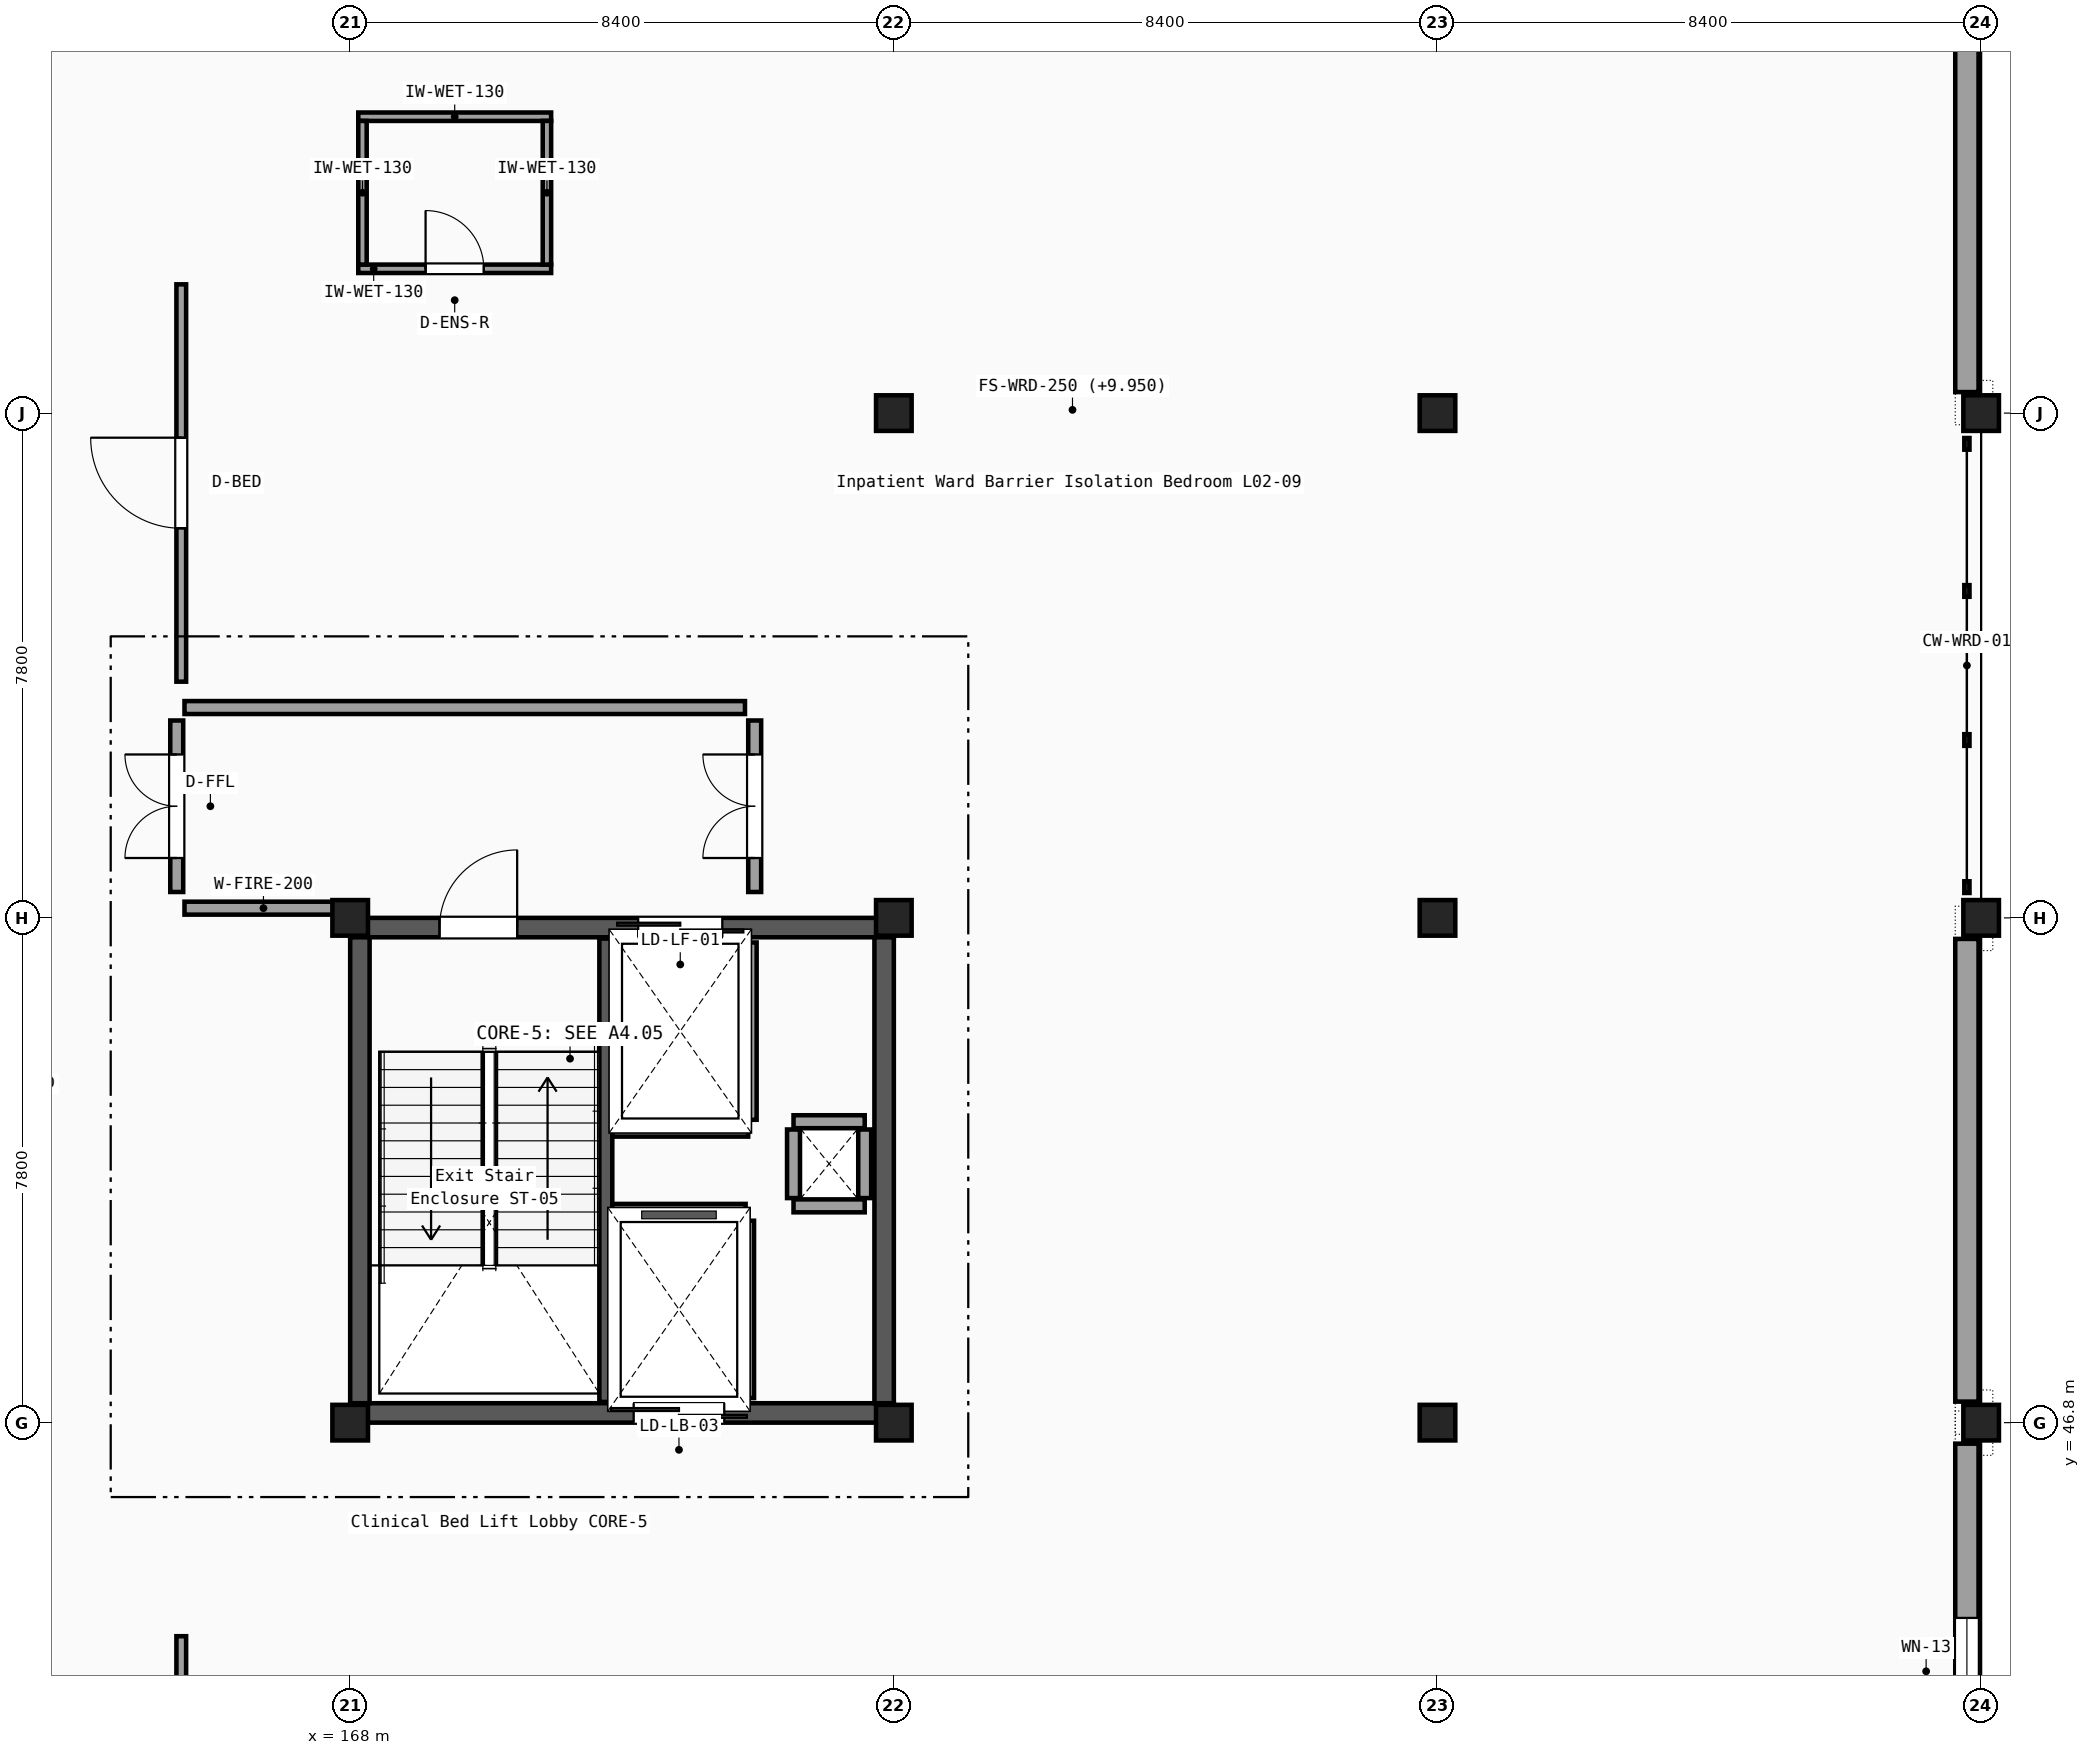
"""IFC4 building model, lengths in metres.
Left out: names, types, materials, properties, quantities, classifications, styles, units other than length and angle.
Written with IfcOpenShell. Run it as: python <this file> out.ifc"""

import sys

from ifc_helpers import new_model, si_unit, direction, frame, frame_2d, origin, origin_2d, place, context, subcontext, project, spatial, rectangle, i_section, extrude, element, fill, save


model = new_model("IFC4")
c1 = context("Model", 3, precision=1e-05, world=origin(), true_north=direction((0.0, 1.0)))
c2 = subcontext(c1, "Body", "Model", "MODEL_VIEW")
j1 = project(units=[si_unit("LENGTHUNIT", "METRE"), si_unit("PLANEANGLEUNIT", "RADIAN")], contexts=[c1])
p1 = place(None, origin())
s1 = spatial("IfcSite", under=j1, at=p1, CompositionType="ELEMENT")
p2 = place(p1, origin())
s2 = spatial("IfcBuilding", under=s1, at=p2, CompositionType="ELEMENT")
p3 = place(p2, frame((0.0, 0.0, 10.2)))
s3 = spatial("IfcBuildingStorey", under=s2, at=p3, CompositionType="ELEMENT", Elevation=10.2)
for number, where, z_axis, x_axis in (
    (1, (168.0, 46.8, 0.0), (0.0, 0.0, 1.0), (1.0, 0.0, 0.0)),
    (2, (168.0, 54.6, 0.0), (0.0, 0.0, 1.0), (1.0, 0.0, 0.0)),
    (3, (176.4, 46.8, 0.0), (0.0, 0.0, 1.0), (1.0, 0.0, 0.0)),
    (4, (176.4, 54.6, 0.0), (0.0, 0.0, 1.0), (1.0, 0.0, 0.0)),
    (5, (176.4, 62.4, 0.0), (0.0, 0.0, 1.0), (1.0, 0.0, 0.0)),
    (6, (184.8, 46.8, 0.0), (0.0, 0.0, 1.0), (1.0, 0.0, 0.0)),
    (7, (184.8, 54.6, 0.0), (0.0, 0.0, 1.0), (1.0, 0.0, 0.0)),
    (8, (184.8, 62.4, 0.0), (0.0, 0.0, 1.0), (1.0, 0.0, 0.0)),
    (9, (193.2, 46.8, 0.0), (0.0, 0.0, 1.0), (1.0, 0.0, 0.0)),
    (10, (193.2, 54.6, 0.0), (0.0, 0.0, 1.0), (1.0, 0.0, 0.0)),
    (11, (193.2, 62.4, 0.0), (0.0, 0.0, 1.0), (1.0, 0.0, 0.0)),
):
    element("IfcColumn", number, at=place(p3, frame(where, z_axis=z_axis, x_axis=x_axis)), inside=s3, PredefinedType="COLUMN", context=c2, shape_type="SweptSolid", body=[
        extrude(i_section(OverallWidth=0.3, OverallDepth=0.55, WebThickness=0.015, FlangeThickness=0.029, FilletRadius=0.027, at=origin_2d()), origin(), (0.0, 0.0, 1.0), 4.65),
    ])
p4 = place(p3, frame((192.98, 39.44, 0.0), z_axis=(0.0, 0.0, 1.0), x_axis=(0.0, 1.0, 0.0)))
e12 = element("IfcWall", 12, at=p4, inside=s3, PredefinedType="SOLIDWALL", context=c2, shape_type="SweptSolid", body=[
    extrude(rectangle(XDim=7.035, YDim=0.36, at=frame_2d((3.518, 0.0))), origin(), (0.0, 0.0, 1.0), 3.95),
])
p5 = place(p4, frame((2.692, 0.0, 0.75)))
e13 = element("IfcOpeningElement", 13, at=p5, cuts=e12, PredefinedType="OPENING", context=c2, shape_type="SweptSolid", body=[
    extrude(rectangle(XDim=1.65, YDim=1.75, at=frame_2d((0.825, 0.875))), frame((0.0, 0.19, 0.0), z_axis=(0.0, -1.0, 0.0), x_axis=(1.0, 0.0, 0.0)), (0.0, 0.0, 1.0), 0.38),
])
for number, where, z_axis, x_axis in (
    (14, (192.98, 47.125, 0.0), (0.0, 0.0, 1.0), (0.0, 1.0, 0.0)),
    (15, (192.98, 62.725, 0.0), (0.0, 0.0, 1.0), (0.0, 1.0, 0.0)),
):
    element("IfcWall", number, at=place(p3, frame(where, z_axis=z_axis, x_axis=x_axis)), inside=s3, PredefinedType="SOLIDWALL", context=c2, shape_type="SweptSolid", body=[
        extrude(rectangle(XDim=7.15, YDim=0.36, at=frame_2d((3.575, 0.0))), origin(), (0.0, 0.0, 1.0), 3.95),
    ])
p6 = place(p3, frame((168.0, 46.95, 0.0), z_axis=(0.0, 0.0, 1.0), x_axis=(1.0, 0.0, 0.0)))
e16 = element("IfcWall", 16, at=p6, inside=s3, PredefinedType="SHEAR", context=c2, shape_type="SweptSolid", body=[
    extrude(rectangle(XDim=8.4, YDim=0.3, at=frame_2d((4.2, 0.0))), origin(), (0.0, 0.0, 1.0), 4.41),
])
p7 = place(p6, frame((4.38, 0.0, 0.0)))
e17 = element("IfcOpeningElement", 17, at=p7, cuts=e16, PredefinedType="OPENING", context=c2, shape_type="SweptSolid", body=[
    extrude(rectangle(XDim=1.4, YDim=2.2, at=frame_2d((0.7, 1.1))), frame((0.0, 0.16, 0.0), z_axis=(0.0, -1.0, 0.0), x_axis=(1.0, 0.0, 0.0)), (0.0, 0.0, 1.0), 0.32),
])
p8 = place(p3, frame((168.0, 54.45, 0.0), z_axis=(0.0, 0.0, 1.0), x_axis=(1.0, 0.0, 0.0)))
e18 = element("IfcWall", 18, at=p8, inside=s3, PredefinedType="SHEAR", context=c2, shape_type="SweptSolid", body=[
    extrude(rectangle(XDim=8.4, YDim=0.3, at=frame_2d((4.2, 0.0))), origin(), (0.0, 0.0, 1.0), 4.41),
])
p9 = place(p8, frame((1.38, 0.0, 0.0)))
e19 = element("IfcOpeningElement", 19, at=p9, cuts=e18, PredefinedType="OPENING", context=c2, shape_type="SweptSolid", body=[
    extrude(rectangle(XDim=1.2, YDim=2.15, at=frame_2d((0.6, 1.075))), frame((0.0, 0.16, 0.0), z_axis=(0.0, -1.0, 0.0), x_axis=(1.0, 0.0, 0.0)), (0.0, 0.0, 1.0), 0.32),
])
p10 = place(p8, frame((4.45, 0.0, 0.0)))
e20 = element("IfcOpeningElement", 20, at=p10, cuts=e18, PredefinedType="OPENING", context=c2, shape_type="SweptSolid", body=[
    extrude(rectangle(XDim=1.3, YDim=2.2, at=frame_2d((0.65, 1.1))), frame((0.0, 0.16, 0.0), z_axis=(0.0, -1.0, 0.0), x_axis=(1.0, 0.0, 0.0)), (0.0, 0.0, 1.0), 0.32),
])
for number, where, z_axis, x_axis in (
    (21, (168.15, 47.1, 0.0), (0.0, 0.0, 1.0), (0.0, 1.0, 0.0)),
    (22, (176.25, 47.1, 0.0), (0.0, 0.0, 1.0), (0.0, 1.0, 0.0)),
):
    element("IfcWall", number, at=place(p3, frame(where, z_axis=z_axis, x_axis=x_axis)), inside=s3, PredefinedType="SHEAR", context=c2, shape_type="SweptSolid", body=[
        extrude(rectangle(XDim=7.2, YDim=0.3, at=frame_2d((3.6, 0.0))), origin(), (0.0, 0.0, 1.0), 4.41),
    ])
p11 = place(p3, frame((171.95, 47.12, 0.0), z_axis=(0.0, 0.0, 1.0), x_axis=(0.0, 1.0, 0.0)))
e23 = element("IfcWall", 23, at=p11, inside=s3, PredefinedType="SHEAR", context=c2, shape_type="SweptSolid", body=[
    extrude(rectangle(XDim=7.16, YDim=0.2, at=frame_2d((3.58, 0.0))), origin(), (0.0, 0.0, 1.0), 4.41),
])
for number, where, z_axis, x_axis in (
    (24, (174.85, 50.15, 0.0), (0.0, 0.0, 1.0), (1.0, 0.0, 0.0)),
    (25, (174.85, 51.45, 0.0), (0.0, 0.0, 1.0), (1.0, 0.0, 0.0)),
):
    element("IfcWall", number, at=place(p3, frame(where, z_axis=z_axis, x_axis=x_axis)), inside=s3, PredefinedType="PARTITIONING", context=c2, shape_type="SweptSolid", body=[
        extrude(rectangle(XDim=1.1, YDim=0.2, at=frame_2d((0.55, 0.0))), origin(), (0.0, 0.0, 1.0), 3.95),
    ])
for number, where, z_axis, x_axis in (
    (26, (174.85, 50.27, 0.0), (0.0, 0.0, 1.0), (0.0, 1.0, 0.0)),
    (27, (175.95, 50.27, 0.0), (0.0, 0.0, 1.0), (0.0, 1.0, 0.0)),
):
    element("IfcWall", number, at=place(p3, frame(where, z_axis=z_axis, x_axis=x_axis)), inside=s3, PredefinedType="PARTITIONING", context=c2, shape_type="SweptSolid", body=[
        extrude(rectangle(XDim=1.06, YDim=0.2, at=frame_2d((0.53, 0.0))), origin(), (0.0, 0.0, 1.0), 3.95),
    ])
p12 = place(p3, frame((174.18, 51.48, 0.0), z_axis=(0.0, 0.0, 1.0), x_axis=(0.0, 1.0, 0.0)))
e28 = element("IfcWall", 28, at=p12, inside=s3, PredefinedType="PARTITIONING", context=c2, shape_type="SweptSolid", body=[
    extrude(rectangle(XDim=2.74, YDim=0.2, at=frame_2d((1.37, 0.0))), origin(), (0.0, 0.0, 1.0), 3.95),
])
p13 = place(p3, frame((172.05, 51.32, 0.0), z_axis=(0.0, 0.0, 1.0), x_axis=(1.0, 0.0, 0.0)))
e29 = element("IfcWall", 29, at=p13, inside=s3, PredefinedType="PARTITIONING", context=c2, shape_type="SweptSolid", body=[
    extrude(rectangle(XDim=2.1, YDim=0.2, at=frame_2d((1.05, 0.0))), origin(), (0.0, 0.0, 1.0), 3.95),
])
p14 = place(p3, frame((174.14, 47.18, 0.0), z_axis=(0.0, 0.0, 1.0), x_axis=(0.0, 1.0, 0.0)))
e30 = element("IfcWall", 30, at=p14, inside=s3, PredefinedType="PARTITIONING", context=c2, shape_type="SweptSolid", body=[
    extrude(rectangle(XDim=2.74, YDim=0.2, at=frame_2d((1.37, 0.0))), origin(), (0.0, 0.0, 1.0), 3.95),
])
p15 = place(p3, frame((172.05, 50.08, 0.0), z_axis=(0.0, 0.0, 1.0), x_axis=(1.0, 0.0, 0.0)))
e31 = element("IfcWall", 31, at=p15, inside=s3, PredefinedType="PARTITIONING", context=c2, shape_type="SweptSolid", body=[
    extrude(rectangle(XDim=2.06, YDim=0.2, at=frame_2d((1.03, 0.0))), origin(), (0.0, 0.0, 1.0), 3.95),
])
p16 = place(p3, frame((165.44, 54.75, 0.0), z_axis=(0.0, 0.0, 1.0), x_axis=(1.0, 0.0, 0.0)))
e32 = element("IfcWall", 32, at=p16, inside=s3, PredefinedType="PARTITIONING", context=c2, shape_type="SweptSolid", body=[
    extrude(rectangle(XDim=2.44, YDim=0.2, at=frame_2d((1.22, 0.0))), origin(), (0.0, 0.0, 1.0), 3.95),
])
p17 = place(p3, frame((165.44, 57.85, 0.0), z_axis=(0.0, 0.0, 1.0), x_axis=(1.0, 0.0, 0.0)))
e33 = element("IfcWall", 33, at=p17, inside=s3, PredefinedType="PARTITIONING", context=c2, shape_type="SweptSolid", body=[
    extrude(rectangle(XDim=8.66, YDim=0.2, at=frame_2d((4.33, 0.0))), origin(), (0.0, 0.0, 1.0), 3.95),
])
p18 = place(p3, frame((165.32, 55.0, 0.0), z_axis=(0.0, 0.0, 1.0), x_axis=(0.0, 1.0, 0.0)))
e34 = element("IfcWall", 34, at=p18, inside=s3, PredefinedType="PARTITIONING", context=c2, shape_type="SweptSolid", body=[
    extrude(rectangle(XDim=2.65, YDim=0.2, at=frame_2d((1.325, 0.0))), origin(), (0.0, 0.0, 1.0), 3.95),
])
p19 = place(p18, frame((0.525, 0.0, 0.0)))
e35 = element("IfcOpeningElement", 35, at=p19, cuts=e34, PredefinedType="OPENING", context=c2, shape_type="SweptSolid", body=[
    extrude(rectangle(XDim=1.6, YDim=2.2, at=frame_2d((0.8, 1.1))), frame((0.0, 0.11, 0.0), z_axis=(0.0, -1.0, 0.0), x_axis=(1.0, 0.0, 0.0)), (0.0, 0.0, 1.0), 0.22),
])
p20 = place(p3, frame((174.25, 55.0, 0.0), z_axis=(0.0, 0.0, 1.0), x_axis=(0.0, 1.0, 0.0)))
e36 = element("IfcWall", 36, at=p20, inside=s3, PredefinedType="PARTITIONING", context=c2, shape_type="SweptSolid", body=[
    extrude(rectangle(XDim=2.65, YDim=0.2, at=frame_2d((1.325, 0.0))), origin(), (0.0, 0.0, 1.0), 3.95),
])
p21 = place(p20, frame((0.525, 0.0, 0.0)))
e37 = element("IfcOpeningElement", 37, at=p21, cuts=e36, PredefinedType="OPENING", context=c2, shape_type="SweptSolid", body=[
    extrude(rectangle(XDim=1.6, YDim=2.2, at=frame_2d((0.8, 1.1))), frame((0.0, 0.11, 0.0), z_axis=(0.0, -1.0, 0.0), x_axis=(1.0, 0.0, 0.0)), (0.0, 0.0, 1.0), 0.22),
])
p22 = place(p3, frame((165.39, 39.62, 0.0), z_axis=(0.0, 0.0, 1.0), x_axis=(0.0, 1.0, 0.0)))
e38 = element("IfcWall", 38, at=p22, inside=s3, PredefinedType="PARTITIONING", context=c2, shape_type="SweptSolid", body=[
    extrude(rectangle(XDim=3.88, YDim=0.15, at=frame_2d((1.94, 0.0))), origin(), (0.0, 0.0, 1.0), 4.37),
])
p23 = place(p22, frame((1.24, 0.0, 0.0)))
e39 = element("IfcOpeningElement", 39, at=p23, cuts=e38, PredefinedType="OPENING", context=c2, shape_type="SweptSolid", body=[
    extrude(rectangle(XDim=1.4, YDim=2.2, at=frame_2d((0.7, 1.1))), frame((0.0, 0.085, 0.0), z_axis=(0.0, -1.0, 0.0), x_axis=(1.0, 0.0, 0.0)), (0.0, 0.0, 1.0), 0.17),
])
p24 = place(p3, frame((165.39, 58.25, 0.0), z_axis=(0.0, 0.0, 1.0), x_axis=(0.0, 1.0, 0.0)))
e40 = element("IfcWall", 40, at=p24, inside=s3, PredefinedType="PARTITIONING", context=c2, shape_type="SweptSolid", body=[
    extrude(rectangle(XDim=6.14, YDim=0.15, at=frame_2d((3.07, 0.0))), origin(), (0.0, 0.0, 1.0), 3.95),
])
p25 = place(p24, frame((2.37, 0.0, 0.0)))
e41 = element("IfcOpeningElement", 41, at=p25, cuts=e40, PredefinedType="OPENING", context=c2, shape_type="SweptSolid", body=[
    extrude(rectangle(XDim=1.4, YDim=2.2, at=frame_2d((0.7, 1.1))), frame((0.0, 0.085, 0.0), z_axis=(0.0, -1.0, 0.0), x_axis=(1.0, 0.0, 0.0)), (0.0, 0.0, 1.0), 0.17),
])
p26 = place(p3, frame((168.125, 64.63, 0.0), z_axis=(0.0, 0.0, 1.0), x_axis=(1.0, 0.0, 0.0)))
e42 = element("IfcWall", 42, at=p26, inside=s3, PredefinedType="PARTITIONING", context=c2, shape_type="SweptSolid", body=[
    extrude(rectangle(XDim=2.98, YDim=0.13, at=frame_2d((1.49, 0.0))), origin(), (0.0, 0.0, 1.0), 4.08),
])
p27 = place(p26, frame((1.04, 0.0, 0.0)))
e43 = element("IfcOpeningElement", 43, at=p27, cuts=e42, PredefinedType="OPENING", context=c2, shape_type="SweptSolid", body=[
    extrude(rectangle(XDim=0.9, YDim=2.1, at=frame_2d((0.45, 1.05))), frame((0.0, 0.075, 0.0), z_axis=(0.0, -1.0, 0.0), x_axis=(1.0, 0.0, 0.0)), (0.0, 0.0, 1.0), 0.15),
])
p28 = place(p3, frame((168.125, 66.98, 0.0), z_axis=(0.0, 0.0, 1.0), x_axis=(1.0, 0.0, 0.0)))
e44 = element("IfcWall", 44, at=p28, inside=s3, PredefinedType="PARTITIONING", context=c2, shape_type="SweptSolid", body=[
    extrude(rectangle(XDim=2.98, YDim=0.13, at=frame_2d((1.49, 0.0))), origin(), (0.0, 0.0, 1.0), 4.08),
])
p29 = place(p3, frame((168.19, 64.695, 0.0), z_axis=(0.0, 0.0, 1.0), x_axis=(0.0, 1.0, 0.0)))
e45 = element("IfcWall", 45, at=p29, inside=s3, PredefinedType="PARTITIONING", context=c2, shape_type="SweptSolid", body=[
    extrude(rectangle(XDim=2.22, YDim=0.13, at=frame_2d((1.11, 0.0))), origin(), (0.0, 0.0, 1.0), 4.08),
])
p30 = place(p3, frame((171.04, 64.695, 0.0), z_axis=(0.0, 0.0, 1.0), x_axis=(0.0, 1.0, 0.0)))
e46 = element("IfcWall", 46, at=p30, inside=s3, PredefinedType="PARTITIONING", context=c2, shape_type="SweptSolid", body=[
    extrude(rectangle(XDim=2.22, YDim=0.13, at=frame_2d((1.11, 0.0))), origin(), (0.0, 0.0, 1.0), 4.37),
])
p31 = place(p5, origin())
e47 = element("IfcWindow", 47, at=p31, inside=s3, PartitioningType="SINGLE_PANEL", PredefinedType="WINDOW", context=c2, shape_type="SweptSolid", body=[
    extrude(rectangle(XDim=1.65, YDim=1.75, at=frame_2d((0.825, 0.875))), frame((0.0, 0.03, 0.0), z_axis=(0.0, -1.0, 0.0), x_axis=(1.0, 0.0, 0.0)), (0.0, 0.0, 1.0), 0.06),
])
fill(e13, e47)
p32 = place(p9, origin())
e48 = element("IfcDoor", 48, at=p32, inside=s3, OperationType="SINGLE_SWING_RIGHT", PredefinedType="DOOR", context=c2, shape_type="SweptSolid", body=[
    extrude(rectangle(XDim=1.2, YDim=2.15, at=frame_2d((0.6, 1.075))), frame((0.0, 0.025, 0.0), z_axis=(0.0, -1.0, 0.0), x_axis=(1.0, 0.0, 0.0)), (0.0, 0.0, 1.0), 0.05),
])
fill(e19, e48)
p33 = place(p10, origin())
e49 = element("IfcDoor", 49, at=p33, inside=s3, OperationType="DOUBLE_DOOR_SLIDING", PredefinedType="DOOR", context=c2, shape_type="SweptSolid", body=[
    extrude(rectangle(XDim=1.3, YDim=2.2, at=frame_2d((0.65, 1.1))), frame((0.0, 0.025, 0.0), z_axis=(0.0, -1.0, 0.0), x_axis=(1.0, 0.0, 0.0)), (0.0, 0.0, 1.0), 0.05),
])
fill(e20, e49)
p34 = place(p7, origin())
e50 = element("IfcDoor", 50, at=p34, inside=s3, OperationType="DOUBLE_DOOR_SLIDING", PredefinedType="DOOR", context=c2, shape_type="SweptSolid", body=[
    extrude(rectangle(XDim=1.4, YDim=2.2, at=frame_2d((0.7, 1.1))), frame((0.0, 0.025, 0.0), z_axis=(0.0, -1.0, 0.0), x_axis=(1.0, 0.0, 0.0)), (0.0, 0.0, 1.0), 0.05),
])
fill(e17, e50)
p35 = place(p19, origin())
e51 = element("IfcDoor", 51, at=p35, inside=s3, OperationType="DOUBLE_DOOR_SINGLE_SWING", PredefinedType="DOOR", context=c2, shape_type="SweptSolid", body=[
    extrude(rectangle(XDim=1.6, YDim=2.2, at=frame_2d((0.8, 1.1))), frame((0.0, 0.025, 0.0), z_axis=(0.0, -1.0, 0.0), x_axis=(1.0, 0.0, 0.0)), (0.0, 0.0, 1.0), 0.05),
])
fill(e35, e51)
p36 = place(p21, origin())
e52 = element("IfcDoor", 52, at=p36, inside=s3, OperationType="DOUBLE_DOOR_SINGLE_SWING", PredefinedType="DOOR", context=c2, shape_type="SweptSolid", body=[
    extrude(rectangle(XDim=1.6, YDim=2.2, at=frame_2d((0.8, 1.1))), frame((0.0, 0.025, 0.0), z_axis=(0.0, -1.0, 0.0), x_axis=(1.0, 0.0, 0.0)), (0.0, 0.0, 1.0), 0.05),
])
fill(e37, e52)
p37 = place(p25, origin())
e53 = element("IfcDoor", 53, at=p37, inside=s3, OperationType="SINGLE_SWING_RIGHT", PredefinedType="DOOR", context=c2, shape_type="SweptSolid", body=[
    extrude(rectangle(XDim=1.4, YDim=2.2, at=frame_2d((0.7, 1.1))), frame((0.0, 0.025, 0.0), z_axis=(0.0, -1.0, 0.0), x_axis=(1.0, 0.0, 0.0)), (0.0, 0.0, 1.0), 0.05),
])
fill(e41, e53)
p38 = place(p27, origin())
e54 = element("IfcDoor", 54, at=p38, inside=s3, OperationType="SINGLE_SWING_LEFT", PredefinedType="DOOR", context=c2, shape_type="SweptSolid", body=[
    extrude(rectangle(XDim=0.9, YDim=2.1, at=frame_2d((0.45, 1.05))), frame((0.0, 0.025, 0.0), z_axis=(0.0, -1.0, 0.0), x_axis=(1.0, 0.0, 0.0)), (0.0, 0.0, 1.0), 0.05),
])
fill(e43, e54)
save(model, sys.argv[1])
